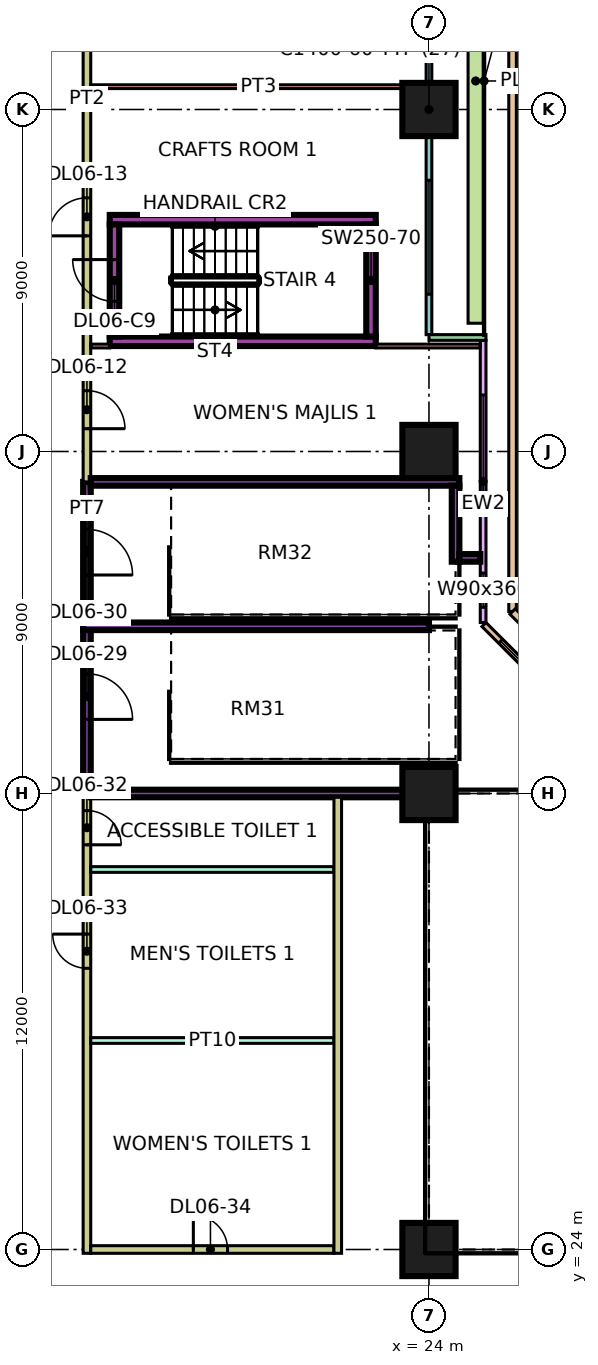
"""IFC4 building model, lengths in metres.
Left out: names, types, materials, properties, quantities, classifications, styles, units other than length and angle.
Written with IfcOpenShell. Run it as: python <this file> out.ifc"""

import sys

from ifc_helpers import new_model, si_unit, direction, frame, frame_2d, origin, origin_2d, place, context, subcontext, project, spatial, rectangle, extrude, element, fill, save


model = new_model("IFC4")
c1 = context("Model", 3, precision=1e-05, world=origin(), true_north=direction((0.0, 1.0)))
c2 = subcontext(c1, "Body", "Model", "MODEL_VIEW")
j1 = project(units=[si_unit("LENGTHUNIT", "METRE"), si_unit("PLANEANGLEUNIT", "RADIAN")], contexts=[c1])
p1 = place(None, origin())
s1 = spatial("IfcSite", under=j1, at=p1, CompositionType="ELEMENT")
p2 = place(p1, origin())
s2 = spatial("IfcBuilding", under=s1, at=p2, CompositionType="ELEMENT")
p3 = place(p2, frame((0.0, 0.0, 35.4)))
s3 = spatial("IfcBuildingStorey", under=s2, at=p3, CompositionType="ELEMENT", Elevation=35.4)
for number, where, z_axis, x_axis in (
    (1, (24.0, 24.0, 0.0), (0.0, 0.0, 1.0), (1.0, 0.0, 0.0)),
    (2, (24.0, 36.0, 0.0), (0.0, 0.0, 1.0), (1.0, 0.0, 0.0)),
    (3, (24.0, 45.0, 0.0), (0.0, 0.0, 1.0), (1.0, 0.0, 0.0)),
    (4, (24.0, 54.0, 0.0), (0.0, 0.0, 1.0), (1.0, 0.0, 0.0)),
):
    element("IfcColumn", number, at=place(p3, frame(where, z_axis=z_axis, x_axis=x_axis)), inside=s3, PredefinedType="COLUMN", context=c2, shape_type="SweptSolid", body=[
        extrude(rectangle(XDim=1.4, YDim=1.4, at=origin_2d()), origin(), (0.0, 0.0, 1.0), 6.0),
    ])
for number, where, z_axis, x_axis in (
    (5, (15.6, 47.9, 0.0), (0.0, 0.0, 1.0), (1.0, 0.0, 0.0)),
    (6, (15.6, 51.1, 0.0), (0.0, 0.0, 1.0), (1.0, 0.0, 0.0)),
):
    element("IfcWall", number, at=place(p3, frame(where, z_axis=z_axis, x_axis=x_axis)), inside=s3, PredefinedType="SHEAR", context=c2, shape_type="SweptSolid", body=[
        extrude(rectangle(XDim=7.0, YDim=0.25, at=frame_2d((3.5, 0.0))), origin(), (0.0, 0.0, 1.0), 6.0),
    ])
p4 = place(p3, frame((15.725, 48.025, 0.0), z_axis=(0.0, 0.0, 1.0), x_axis=(0.0, 1.0, 0.0)))
e7 = element("IfcWall", 7, at=p4, inside=s3, PredefinedType="SHEAR", context=c2, shape_type="SweptSolid", body=[
    extrude(rectangle(XDim=2.95, YDim=0.25, at=frame_2d((1.475, 0.0))), origin(), (0.0, 0.0, 1.0), 6.0),
])
p5 = place(p4, frame((0.925, 0.0, 0.0)))
e8 = element("IfcOpeningElement", 8, at=p5, cuts=e7, PredefinedType="OPENING", context=c2, shape_type="SweptSolid", body=[
    extrude(rectangle(XDim=1.1, YDim=2.2, at=frame_2d((0.55, 1.1))), frame((0.0, 0.135, 0.0), z_axis=(0.0, -1.0, 0.0), x_axis=(1.0, 0.0, 0.0)), (0.0, 0.0, 1.0), 0.27),
])
p6 = place(p3, frame((22.475, 48.025, 0.0), z_axis=(0.0, 0.0, 1.0), x_axis=(0.0, 1.0, 0.0)))
e9 = element("IfcWall", 9, at=p6, inside=s3, PredefinedType="SHEAR", context=c2, shape_type="SweptSolid", body=[
    extrude(rectangle(XDim=2.95, YDim=0.25, at=frame_2d((1.475, 0.0))), origin(), (0.0, 0.0, 1.0), 6.0),
])
p7 = place(p3, frame((28.447, 37.447, 0.0), z_axis=(0.0, 0.0, 1.0), x_axis=(-0.707106781187, 0.707106781187, 0.0)))
e10 = element("IfcWall", 10, at=p7, inside=s3, PredefinedType="SOLIDWALL", context=c2, shape_type="SweptSolid", body=[
    extrude(rectangle(XDim=4.243, YDim=0.15, at=frame_2d((2.121, 0.0))), origin(), (0.0, 0.0, 1.0), 5.6),
])
p8 = place(p7, frame((0.621, 0.0, 0.45)))
e11 = element("IfcOpeningElement", 11, at=p8, cuts=e10, PredefinedType="OPENING", context=c2, shape_type="SweptSolid", body=[
    extrude(rectangle(XDim=3.0, YDim=3.6, at=frame_2d((1.5, 1.8))), frame((0.0, 0.085, 0.0), z_axis=(0.0, -1.0, 0.0), x_axis=(1.0, 0.0, 0.0)), (0.0, 0.0, 1.0), 0.17),
])
p9 = place(p3, frame((25.425, 40.5, 0.0), z_axis=(0.0, 0.0, 1.0), x_axis=(0.0, 1.0, 0.0)))
e12 = element("IfcWall", 12, at=p9, inside=s3, PredefinedType="SOLIDWALL", context=c2, shape_type="SweptSolid", body=[
    extrude(rectangle(XDim=7.425, YDim=0.15, at=frame_2d((3.712, 0.0))), origin(), (0.0, 0.0, 1.0), 5.6),
])
p10 = place(p9, frame((0.4, 0.0, 0.45)))
e13 = element("IfcOpeningElement", 13, at=p10, cuts=e12, PredefinedType="OPENING", context=c2, shape_type="SweptSolid", body=[
    extrude(rectangle(XDim=0.9, YDim=3.6, at=frame_2d((0.45, 1.8))), frame((0.0, 0.085, 0.0), z_axis=(0.0, -1.0, 0.0), x_axis=(1.0, 0.0, 0.0)), (0.0, 0.0, 1.0), 0.17),
])
p11 = place(p9, frame((2.988, 0.0, 0.45)))
e14 = element("IfcOpeningElement", 14, at=p11, cuts=e12, PredefinedType="OPENING", context=c2, shape_type="SweptSolid", body=[
    extrude(rectangle(XDim=3.0, YDim=3.6, at=frame_2d((1.5, 1.8))), frame((0.0, 0.085, 0.0), z_axis=(0.0, -1.0, 0.0), x_axis=(1.0, 0.0, 0.0)), (0.0, 0.0, 1.0), 0.17),
])
p12 = place(p3, frame((24.0, 48.075, 0.0), z_axis=(0.0, 0.0, 1.0), x_axis=(0.0, 1.0, 0.0)))
e15 = element("IfcWall", 15, at=p12, inside=s3, PredefinedType="SOLIDWALL", context=c2, shape_type="SweptSolid", body=[
    extrude(rectangle(XDim=13.35, YDim=0.15, at=frame_2d((6.675, 0.0))), origin(), (0.0, 0.0, 1.0), 5.6),
])
p13 = place(p12, frame((1.062, 0.0, 0.45)))
e16 = element("IfcOpeningElement", 16, at=p13, cuts=e15, PredefinedType="OPENING", context=c2, shape_type="SweptSolid", body=[
    extrude(rectangle(XDim=3.0, YDim=3.6, at=frame_2d((1.5, 1.8))), frame((0.0, 0.085, 0.0), z_axis=(0.0, -1.0, 0.0), x_axis=(1.0, 0.0, 0.0)), (0.0, 0.0, 1.0), 0.17),
])
p14 = place(p12, frame((8.225, 0.0, 0.45)))
e17 = element("IfcOpeningElement", 17, at=p14, cuts=e15, PredefinedType="OPENING", context=c2, shape_type="SweptSolid", body=[
    extrude(rectangle(XDim=3.0, YDim=3.6, at=frame_2d((1.5, 1.8))), frame((0.0, 0.085, 0.0), z_axis=(0.0, -1.0, 0.0), x_axis=(1.0, 0.0, 0.0)), (0.0, 0.0, 1.0), 0.17),
])
p15 = place(p3, frame((25.5, 48.0, 0.0), z_axis=(0.0, 0.0, 1.0), x_axis=(-1.0, 0.0, 0.0)))
e18 = element("IfcWall", 18, at=p15, inside=s3, PredefinedType="SOLIDWALL", context=c2, shape_type="SweptSolid", body=[
    extrude(rectangle(XDim=1.5, YDim=0.15, at=frame_2d((0.75, 0.0))), origin(), (0.0, 0.0, 1.0), 5.6),
])
p16 = place(p3, frame((25.229, 48.375, 0.0), z_axis=(0.0, 0.0, 1.0), x_axis=(0.0, 1.0, 0.0)))
e19 = element("IfcWall", 19, at=p16, inside=s3, PredefinedType="SOLIDWALL", context=c2, shape_type="SweptSolid", body=[
    extrude(rectangle(XDim=12.75, YDim=0.4, at=frame_2d((6.375, 0.0))), origin(), (0.0, 0.0, 1.0), 0.7),
])
p17 = place(p3, frame((26.2, 61.79, 0.0), z_axis=(0.0, 0.0, 1.0), x_axis=(0.0, -1.0, 0.0)))
e20 = element("IfcWall", 20, at=p17, inside=s3, PredefinedType="PARAPET", context=c2, shape_type="SweptSolid", body=[
    extrude(rectangle(XDim=21.0, YDim=0.2, at=frame_2d((10.5, 0.0))), origin(), (0.0, 0.0, 1.0), 0.5),
])
p18 = place(p3, frame((26.2, 40.79, 0.0), z_axis=(0.0, 0.0, 1.0), x_axis=(0.707106781187, -0.707106781187, 0.0)))
e21 = element("IfcWall", 21, at=p18, inside=s3, PredefinedType="PARAPET", context=c2, shape_type="SweptSolid", body=[
    extrude(rectangle(XDim=3.663, YDim=0.2, at=frame_2d((1.832, 0.0))), origin(), (0.0, 0.0, 1.0), 0.5),
])
p19 = place(p3, frame((14.9, 40.4, 0.0), z_axis=(0.0, 0.0, 1.0), x_axis=(1.0, 0.0, 0.0)))
e22 = element("IfcWall", 22, at=p19, inside=s3, PredefinedType="SOLIDWALL", context=c2, shape_type="SweptSolid", body=[
    extrude(rectangle(XDim=9.1, YDim=0.2, at=frame_2d((4.55, 0.0))), origin(), (0.0, 0.0, 1.0), 5.6),
])
p20 = place(p3, frame((15.0, 23.9, 0.0), z_axis=(0.0, 0.0, 1.0), x_axis=(0.0, 1.0, 0.0)))
e23 = element("IfcWall", 23, at=p20, inside=s3, PredefinedType="PARTITIONING", context=c2, shape_type="SweptSolid", body=[
    extrude(rectangle(XDim=12.1, YDim=0.2, at=frame_2d((6.05, 0.0))), origin(), (0.0, 0.0, 1.0), 5.6),
])
p21 = place(p20, frame((10.75, 0.0, 0.0)))
e24 = element("IfcOpeningElement", 24, at=p21, cuts=e23, PredefinedType="OPENING", context=c2, shape_type="SweptSolid", body=[
    extrude(rectangle(XDim=0.9, YDim=2.1, at=frame_2d((0.45, 1.05))), frame((0.0, 0.11, 0.0), z_axis=(0.0, -1.0, 0.0), x_axis=(1.0, 0.0, 0.0)), (0.0, 0.0, 1.0), 0.22),
])
p22 = place(p20, frame((7.5, 0.0, 0.0)))
e25 = element("IfcOpeningElement", 25, at=p22, cuts=e23, PredefinedType="OPENING", context=c2, shape_type="SweptSolid", body=[
    extrude(rectangle(XDim=0.9, YDim=2.1, at=frame_2d((0.45, 1.05))), frame((0.0, 0.11, 0.0), z_axis=(0.0, -1.0, 0.0), x_axis=(1.0, 0.0, 0.0)), (0.0, 0.0, 1.0), 0.22),
])
p23 = place(p3, frame((15.0, 36.0, 0.0), z_axis=(0.0, 0.0, 1.0), x_axis=(0.0, 1.0, 0.0)))
e26 = element("IfcWall", 26, at=p23, inside=s3, PredefinedType="SOLIDWALL", context=c2, shape_type="SweptSolid", body=[
    extrude(rectangle(XDim=4.3, YDim=0.2, at=frame_2d((2.15, 0.0))), origin(), (0.0, 0.0, 1.0), 5.6),
])
p24 = place(p23, frame((1.95, 0.0, 0.0)))
e27 = element("IfcOpeningElement", 27, at=p24, cuts=e26, PredefinedType="OPENING", context=c2, shape_type="SweptSolid", body=[
    extrude(rectangle(XDim=1.2, YDim=2.1, at=frame_2d((0.6, 1.05))), frame((0.0, 0.11, 0.0), z_axis=(0.0, -1.0, 0.0), x_axis=(1.0, 0.0, 0.0)), (0.0, 0.0, 1.0), 0.22),
])
p25 = place(p3, frame((15.0, 40.6, 0.0), z_axis=(0.0, 0.0, 1.0), x_axis=(0.0, 1.0, 0.0)))
e28 = element("IfcWall", 28, at=p25, inside=s3, PredefinedType="SOLIDWALL", context=c2, shape_type="SweptSolid", body=[
    extrude(rectangle(XDim=3.6, YDim=0.2, at=frame_2d((1.8, 0.0))), origin(), (0.0, 0.0, 1.0), 5.6),
])
p26 = place(p25, frame((1.15, 0.0, 0.0)))
e29 = element("IfcOpeningElement", 29, at=p26, cuts=e28, PredefinedType="OPENING", context=c2, shape_type="SweptSolid", body=[
    extrude(rectangle(XDim=1.2, YDim=2.1, at=frame_2d((0.6, 1.05))), frame((0.0, 0.11, 0.0), z_axis=(0.0, -1.0, 0.0), x_axis=(1.0, 0.0, 0.0)), (0.0, 0.0, 1.0), 0.22),
])
p27 = place(p3, frame((15.0, 44.2, 0.0), z_axis=(0.0, 0.0, 1.0), x_axis=(0.0, 1.0, 0.0)))
e30 = element("IfcWall", 30, at=p27, inside=s3, PredefinedType="PARTITIONING", context=c2, shape_type="SweptSolid", body=[
    extrude(rectangle(XDim=20.151, YDim=0.2, at=frame_2d((10.076, 0.0))), origin(), (0.0, 0.0, 1.0), 5.6),
])
p28 = place(p27, frame((1.4, 0.0, 0.0)))
e31 = element("IfcOpeningElement", 31, at=p28, cuts=e30, PredefinedType="OPENING", context=c2, shape_type="SweptSolid", body=[
    extrude(rectangle(XDim=1.0, YDim=2.1, at=frame_2d((0.5, 1.05))), frame((0.0, 0.11, 0.0), z_axis=(0.0, -1.0, 0.0), x_axis=(1.0, 0.0, 0.0)), (0.0, 0.0, 1.0), 0.22),
])
p29 = place(p27, frame((6.475, 0.0, 0.0)))
e32 = element("IfcOpeningElement", 32, at=p29, cuts=e30, PredefinedType="OPENING", context=c2, shape_type="SweptSolid", body=[
    extrude(rectangle(XDim=1.0, YDim=2.1, at=frame_2d((0.5, 1.05))), frame((0.0, 0.11, 0.0), z_axis=(0.0, -1.0, 0.0), x_axis=(1.0, 0.0, 0.0)), (0.0, 0.0, 1.0), 0.22),
])
p30 = place(p27, frame((13.05, 0.0, 0.0)))
e33 = element("IfcOpeningElement", 33, at=p30, cuts=e30, PredefinedType="OPENING", context=c2, shape_type="SweptSolid", body=[
    extrude(rectangle(XDim=1.0, YDim=2.1, at=frame_2d((0.5, 1.05))), frame((0.0, 0.11, 0.0), z_axis=(0.0, -1.0, 0.0), x_axis=(1.0, 0.0, 0.0)), (0.0, 0.0, 1.0), 0.22),
])
p31 = place(p27, frame((17.5, 0.0, 0.0)))
e34 = element("IfcOpeningElement", 34, at=p31, cuts=e30, PredefinedType="OPENING", context=c2, shape_type="SweptSolid", body=[
    extrude(rectangle(XDim=1.0, YDim=2.1, at=frame_2d((0.5, 1.05))), frame((0.0, 0.11, 0.0), z_axis=(0.0, -1.0, 0.0), x_axis=(1.0, 0.0, 0.0)), (0.0, 0.0, 1.0), 0.22),
])
p32 = place(p3, frame((15.1, 24.0, 0.0), z_axis=(0.0, 0.0, 1.0), x_axis=(1.0, 0.0, 0.0)))
e35 = element("IfcWall", 35, at=p32, inside=s3, PredefinedType="PARTITIONING", context=c2, shape_type="SweptSolid", body=[
    extrude(rectangle(XDim=6.4, YDim=0.2, at=frame_2d((3.2, 0.0))), origin(), (0.0, 0.0, 1.0), 5.6),
])
p33 = place(p32, frame((2.7, 0.0, 0.0)))
e36 = element("IfcOpeningElement", 36, at=p33, cuts=e35, PredefinedType="OPENING", context=c2, shape_type="SweptSolid", body=[
    extrude(rectangle(XDim=0.9, YDim=2.1, at=frame_2d((0.45, 1.05))), frame((0.0, 0.11, 0.0), z_axis=(0.0, -1.0, 0.0), x_axis=(1.0, 0.0, 0.0)), (0.0, 0.0, 1.0), 0.22),
])
for number, where, z_axis, x_axis in (
    (37, (15.1, 29.5, 0.0), (0.0, 0.0, 1.0), (1.0, 0.0, 0.0)),
    (38, (15.1, 34.0, 0.0), (0.0, 0.0, 1.0), (1.0, 0.0, 0.0)),
):
    element("IfcWall", number, at=place(p3, frame(where, z_axis=z_axis, x_axis=x_axis)), inside=s3, PredefinedType="PARTITIONING", context=c2, shape_type="SweptSolid", body=[
        extrude(rectangle(XDim=6.4, YDim=0.15, at=frame_2d((3.2, 0.0))), origin(), (0.0, 0.0, 1.0), 5.6),
    ])
p34 = place(p3, frame((15.1, 36.0, 0.0), z_axis=(0.0, 0.0, 1.0), x_axis=(1.0, 0.0, 0.0)))
e39 = element("IfcWall", 39, at=p34, inside=s3, PredefinedType="SOLIDWALL", context=c2, shape_type="SweptSolid", body=[
    extrude(rectangle(XDim=8.9, YDim=0.2, at=frame_2d((4.45, 0.0))), origin(), (0.0, 0.0, 1.0), 5.6),
])
p35 = place(p3, frame((15.1, 44.2, 0.0), z_axis=(0.0, 0.0, 1.0), x_axis=(1.0, 0.0, 0.0)))
e40 = element("IfcWall", 40, at=p35, inside=s3, PredefinedType="SOLIDWALL", context=c2, shape_type="SweptSolid", body=[
    extrude(rectangle(XDim=9.7, YDim=0.2, at=frame_2d((4.85, 0.0))), origin(), (0.0, 0.0, 1.0), 5.6),
])
p36 = place(p3, frame((15.1, 47.775, 0.0), z_axis=(0.0, 0.0, 1.0), x_axis=(1.0, 0.0, 0.0)))
e41 = element("IfcWall", 41, at=p36, inside=s3, PredefinedType="PARTITIONING", context=c2, shape_type="SweptSolid", body=[
    extrude(rectangle(XDim=0.5, YDim=0.1, at=frame_2d((0.25, 0.0))), origin(), (0.0, 0.0, 1.0), 5.6),
])
p37 = place(p3, frame((15.1, 54.6, 0.0), z_axis=(0.0, 0.0, 1.0), x_axis=(1.0, 0.0, 0.0)))
e42 = element("IfcWall", 42, at=p37, inside=s3, PredefinedType="PARTITIONING", context=c2, shape_type="SweptSolid", body=[
    extrude(rectangle(XDim=8.826, YDim=0.1, at=frame_2d((4.413, 0.0))), origin(), (0.0, 0.0, 1.0), 5.6),
])
p38 = place(p3, frame((21.6, 23.9, 0.0), z_axis=(0.0, 0.0, 1.0), x_axis=(0.0, 1.0, 0.0)))
e43 = element("IfcWall", 43, at=p38, inside=s3, PredefinedType="PARTITIONING", context=c2, shape_type="SweptSolid", body=[
    extrude(rectangle(XDim=12.0, YDim=0.2, at=frame_2d((6.0, 0.0))), origin(), (0.0, 0.0, 1.0), 5.6),
])
p39 = place(p3, frame((22.6, 47.775, 0.0), z_axis=(0.0, 0.0, 1.0), x_axis=(1.0, 0.0, 0.0)))
e44 = element("IfcWall", 44, at=p39, inside=s3, PredefinedType="PARTITIONING", context=c2, shape_type="SweptSolid", body=[
    extrude(rectangle(XDim=2.751, YDim=0.1, at=frame_2d((1.375, 0.0))), origin(), (0.0, 0.0, 1.0), 5.6),
])
p40 = place(p3, frame((24.7, 42.1, 0.0), z_axis=(0.0, 0.0, 1.0), x_axis=(0.0, 1.0, 0.0)))
e45 = element("IfcWall", 45, at=p40, inside=s3, PredefinedType="SOLIDWALL", context=c2, shape_type="SweptSolid", body=[
    extrude(rectangle(XDim=2.0, YDim=0.2, at=frame_2d((1.0, 0.0))), origin(), (0.0, 0.0, 1.0), 5.6),
])
p41 = place(p3, frame((24.8, 42.2, 0.0), z_axis=(0.0, 0.0, 1.0), x_axis=(1.0, 0.0, 0.0)))
e46 = element("IfcWall", 46, at=p41, inside=s3, PredefinedType="SOLIDWALL", context=c2, shape_type="SweptSolid", body=[
    extrude(rectangle(XDim=0.551, YDim=0.2, at=frame_2d((0.275, 0.0))), origin(), (0.0, 0.0, 1.0), 5.6),
])
p42 = place(p8, origin())
e47 = element("IfcWindow", 47, at=p42, inside=s3, PartitioningType="SINGLE_PANEL", PredefinedType="WINDOW", context=c2, shape_type="SweptSolid", body=[
    extrude(rectangle(XDim=3.0, YDim=3.6, at=frame_2d((1.5, 1.8))), frame((0.0, 0.03, 0.0), z_axis=(0.0, -1.0, 0.0), x_axis=(1.0, 0.0, 0.0)), (0.0, 0.0, 1.0), 0.06),
])
fill(e11, e47)
p43 = place(p10, origin())
e48 = element("IfcWindow", 48, at=p43, inside=s3, PartitioningType="SINGLE_PANEL", PredefinedType="WINDOW", context=c2, shape_type="SweptSolid", body=[
    extrude(rectangle(XDim=0.9, YDim=3.6, at=frame_2d((0.45, 1.8))), frame((0.0, 0.03, 0.0), z_axis=(0.0, -1.0, 0.0), x_axis=(1.0, 0.0, 0.0)), (0.0, 0.0, 1.0), 0.06),
])
fill(e13, e48)
p44 = place(p11, origin())
e49 = element("IfcWindow", 49, at=p44, inside=s3, PartitioningType="SINGLE_PANEL", PredefinedType="WINDOW", context=c2, shape_type="SweptSolid", body=[
    extrude(rectangle(XDim=3.0, YDim=3.6, at=frame_2d((1.5, 1.8))), frame((0.0, 0.03, 0.0), z_axis=(0.0, -1.0, 0.0), x_axis=(1.0, 0.0, 0.0)), (0.0, 0.0, 1.0), 0.06),
])
fill(e14, e49)
p45 = place(p13, origin())
e50 = element("IfcWindow", 50, at=p45, inside=s3, PartitioningType="SINGLE_PANEL", PredefinedType="WINDOW", context=c2, shape_type="SweptSolid", body=[
    extrude(rectangle(XDim=3.0, YDim=3.6, at=frame_2d((1.5, 1.8))), frame((0.0, 0.03, 0.0), z_axis=(0.0, -1.0, 0.0), x_axis=(1.0, 0.0, 0.0)), (0.0, 0.0, 1.0), 0.06),
])
fill(e16, e50)
p46 = place(p5, frame((1.1, 0.0, 0.0), z_axis=(0.0, 0.0, 1.0), x_axis=(-1.0, 0.0, 0.0)))
e51 = element("IfcDoor", 51, at=p46, inside=s3, OperationType="SINGLE_SWING_RIGHT", PredefinedType="DOOR", context=c2, shape_type="SweptSolid", body=[
    extrude(rectangle(XDim=1.1, YDim=2.2, at=frame_2d((0.55, 1.1))), frame((0.0, 0.025, 0.0), z_axis=(0.0, -1.0, 0.0), x_axis=(1.0, 0.0, 0.0)), (0.0, 0.0, 1.0), 0.05),
])
fill(e8, e51)
p47 = place(p28, frame((1.0, 0.0, 0.0), z_axis=(0.0, 0.0, 1.0), x_axis=(-1.0, 0.0, 0.0)))
e52 = element("IfcDoor", 52, at=p47, inside=s3, OperationType="SINGLE_SWING_LEFT", PredefinedType="DOOR", context=c2, shape_type="SweptSolid", body=[
    extrude(rectangle(XDim=1.0, YDim=2.1, at=frame_2d((0.5, 1.05))), frame((0.0, 0.025, 0.0), z_axis=(0.0, -1.0, 0.0), x_axis=(1.0, 0.0, 0.0)), (0.0, 0.0, 1.0), 0.05),
])
fill(e31, e52)
p48 = place(p29, origin())
e53 = element("IfcDoor", 53, at=p48, inside=s3, OperationType="SINGLE_SWING_LEFT", PredefinedType="DOOR", context=c2, shape_type="SweptSolid", body=[
    extrude(rectangle(XDim=1.0, YDim=2.1, at=frame_2d((0.5, 1.05))), frame((0.0, 0.025, 0.0), z_axis=(0.0, -1.0, 0.0), x_axis=(1.0, 0.0, 0.0)), (0.0, 0.0, 1.0), 0.05),
])
fill(e32, e53)
p49 = place(p24, frame((1.2, 0.0, 0.0), z_axis=(0.0, 0.0, 1.0), x_axis=(-1.0, 0.0, 0.0)))
e54 = element("IfcDoor", 54, at=p49, inside=s3, OperationType="SINGLE_SWING_LEFT", PredefinedType="DOOR", context=c2, shape_type="SweptSolid", body=[
    extrude(rectangle(XDim=1.2, YDim=2.1, at=frame_2d((0.6, 1.05))), frame((0.0, 0.025, 0.0), z_axis=(0.0, -1.0, 0.0), x_axis=(1.0, 0.0, 0.0)), (0.0, 0.0, 1.0), 0.05),
])
fill(e27, e54)
p50 = place(p26, frame((1.2, 0.0, 0.0), z_axis=(0.0, 0.0, 1.0), x_axis=(-1.0, 0.0, 0.0)))
e55 = element("IfcDoor", 55, at=p50, inside=s3, OperationType="SINGLE_SWING_LEFT", PredefinedType="DOOR", context=c2, shape_type="SweptSolid", body=[
    extrude(rectangle(XDim=1.2, YDim=2.1, at=frame_2d((0.6, 1.05))), frame((0.0, 0.025, 0.0), z_axis=(0.0, -1.0, 0.0), x_axis=(1.0, 0.0, 0.0)), (0.0, 0.0, 1.0), 0.05),
])
fill(e29, e55)
p51 = place(p21, frame((0.9, 0.0, 0.0), z_axis=(0.0, 0.0, 1.0), x_axis=(-1.0, 0.0, 0.0)))
e56 = element("IfcDoor", 56, at=p51, inside=s3, OperationType="SINGLE_SWING_LEFT", PredefinedType="DOOR", context=c2, shape_type="SweptSolid", body=[
    extrude(rectangle(XDim=0.9, YDim=2.1, at=frame_2d((0.45, 1.05))), frame((0.0, 0.025, 0.0), z_axis=(0.0, -1.0, 0.0), x_axis=(1.0, 0.0, 0.0)), (0.0, 0.0, 1.0), 0.05),
])
fill(e24, e56)
p52 = place(p22, frame((0.9, 0.0, 0.0), z_axis=(0.0, 0.0, 1.0), x_axis=(-1.0, 0.0, 0.0)))
e57 = element("IfcDoor", 57, at=p52, inside=s3, OperationType="SINGLE_SWING_RIGHT", PredefinedType="DOOR", context=c2, shape_type="SweptSolid", body=[
    extrude(rectangle(XDim=0.9, YDim=2.1, at=frame_2d((0.45, 1.05))), frame((0.0, 0.025, 0.0), z_axis=(0.0, -1.0, 0.0), x_axis=(1.0, 0.0, 0.0)), (0.0, 0.0, 1.0), 0.05),
])
fill(e25, e57)
p53 = place(p33, origin())
e58 = element("IfcDoor", 58, at=p53, inside=s3, OperationType="SINGLE_SWING_LEFT", PredefinedType="DOOR", context=c2, shape_type="SweptSolid", body=[
    extrude(rectangle(XDim=0.9, YDim=2.1, at=frame_2d((0.45, 1.05))), frame((0.0, 0.025, 0.0), z_axis=(0.0, -1.0, 0.0), x_axis=(1.0, 0.0, 0.0)), (0.0, 0.0, 1.0), 0.05),
])
fill(e36, e58)
save(model, sys.argv[1])
